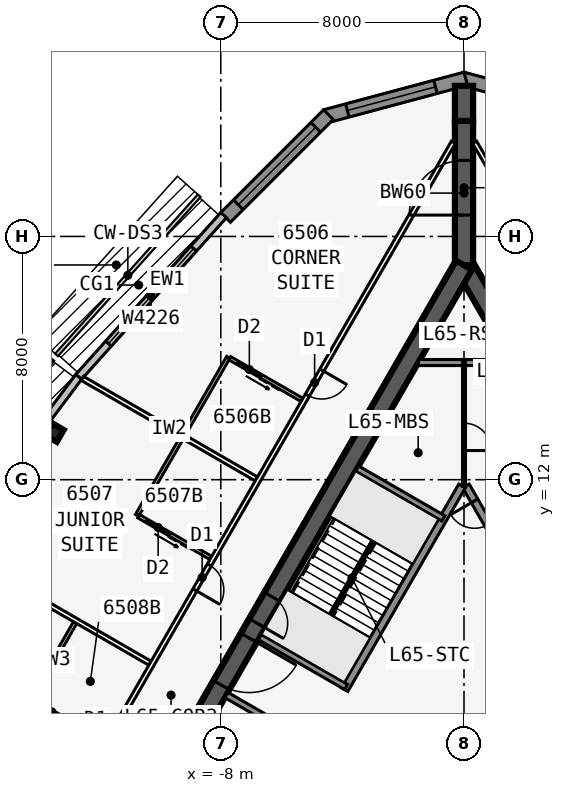
"""IFC4 building model, lengths in metres.
Left out: names, types, materials, properties, quantities, classifications, styles, units other than length and angle.
Written with IfcOpenShell. Run it as: python <this file> out.ifc"""

import sys

from ifc_helpers import new_model, si_unit, direction, frame, frame_2d, origin, origin_2d, place, context, subcontext, project, spatial, polyline, rectangle, i_section, outline, extrude, element, fill, save


model = new_model("IFC4")
c1 = context("Model", 3, precision=1e-05, world=origin(), true_north=direction((0.0, 1.0)))
c2 = subcontext(c1, "Body", "Model", "MODEL_VIEW")
j1 = project(units=[si_unit("LENGTHUNIT", "METRE"), si_unit("PLANEANGLEUNIT", "RADIAN")], contexts=[c1])
p1 = place(None, origin())
s1 = spatial("IfcSite", under=j1, at=p1, CompositionType="ELEMENT")
p2 = place(p1, origin())
s2 = spatial("IfcBuilding", under=s1, at=p2, CompositionType="ELEMENT")
p3 = place(p2, frame((0.0, 0.0, 246.5)))
s3 = spatial("IfcBuildingStorey", under=s2, at=p3, CompositionType="ELEMENT", Elevation=246.5)
p4 = place(p3, frame((16.5, -9.526, 0.0), z_axis=(0.0, 0.0, 1.0), x_axis=(-0.499999749417, 0.866025548458, 0.0)))
e1 = element("IfcWall", 1, at=p4, inside=s3, PredefinedType="SHEAR", context=c2, shape_type="SweptSolid", body=[
    extrude(rectangle(XDim=33.0, YDim=0.6, at=frame_2d((16.5, 0.0))), origin(), (0.0, 0.0, 1.0), 3.6),
])
p5 = place(p4, frame((14.15, 0.0, 0.0)))
e2 = element("IfcOpeningElement", 2, at=p5, cuts=e1, PredefinedType="OPENING", context=c2, shape_type="SweptSolid", body=[
    extrude(rectangle(XDim=1.8, YDim=2.13, at=frame_2d((0.9, 1.065))), frame((0.0, 0.31, 0.0), z_axis=(0.0, -1.0, 0.0), x_axis=(1.0, 0.0, 0.0)), (0.0, 0.0, 1.0), 0.62),
])
p6 = place(p4, frame((12.6, 0.0, 0.0)))
e3 = element("IfcOpeningElement", 3, at=p6, cuts=e1, PredefinedType="OPENING", context=c2, shape_type="SweptSolid", body=[
    extrude(rectangle(XDim=1.0, YDim=2.13, at=frame_2d((0.5, 1.065))), frame((0.0, 0.31, 0.0), z_axis=(0.0, -1.0, 0.0), x_axis=(1.0, 0.0, 0.0)), (0.0, 0.0, 1.0), 0.62),
])
p7 = place(p3, frame((5.379, 2.586, 0.0), z_axis=(0.0, 0.0, 1.0), x_axis=(-0.500001375892, 0.866024609411, 0.0)))
e4 = element("IfcWall", 4, at=p7, inside=s3, PredefinedType="SOLIDWALL", context=c2, shape_type="SweptSolid", body=[
    extrude(rectangle(XDim=10.633, YDim=0.25, at=frame_2d((5.316, 0.0))), origin(), (0.0, 0.0, 1.0), 3.435),
])
p8 = place(p7, frame((9.164, 0.0, 0.0)))
e5 = element("IfcOpeningElement", 5, at=p8, cuts=e4, PredefinedType="OPENING", context=c2, shape_type="SweptSolid", body=[
    extrude(rectangle(XDim=0.9, YDim=2.13, at=frame_2d((0.45, 1.065))), frame((0.0, 0.135, 0.0), z_axis=(0.0, -1.0, 0.0), x_axis=(1.0, 0.0, 0.0)), (0.0, 0.0, 1.0), 0.27),
])
p9 = place(p7, frame((1.0, 0.0, 0.0)))
e6 = element("IfcOpeningElement", 6, at=p9, cuts=e4, PredefinedType="OPENING", context=c2, shape_type="SweptSolid", body=[
    extrude(rectangle(XDim=1.1, YDim=2.13, at=frame_2d((0.55, 1.065))), frame((0.0, 0.135, 0.0), z_axis=(0.0, -1.0, 0.0), x_axis=(1.0, 0.0, 0.0)), (0.0, 0.0, 1.0), 0.27),
])
p10 = place(p7, frame((3.9, 0.0, 0.0)))
e7 = element("IfcOpeningElement", 7, at=p10, cuts=e4, PredefinedType="OPENING", context=c2, shape_type="SweptSolid", body=[
    extrude(rectangle(XDim=1.1, YDim=2.13, at=frame_2d((0.55, 1.065))), frame((0.0, 0.135, 0.0), z_axis=(0.0, -1.0, 0.0), x_axis=(1.0, 0.0, 0.0)), (0.0, 0.0, 1.0), 0.27),
])
p11 = place(p7, frame((6.8, 0.0, 0.0)))
e8 = element("IfcOpeningElement", 8, at=p11, cuts=e4, PredefinedType="OPENING", context=c2, shape_type="SweptSolid", body=[
    extrude(rectangle(XDim=1.1, YDim=2.13, at=frame_2d((0.55, 1.065))), frame((0.0, 0.135, 0.0), z_axis=(0.0, -1.0, 0.0), x_axis=(1.0, 0.0, 0.0)), (0.0, 0.0, 1.0), 0.27),
])
p12 = place(p3, frame((0.0, 19.052, 0.0), z_axis=(0.0, 0.0, 1.0), x_axis=(-0.499999749417, -0.866025548458, 0.0)))
e9 = element("IfcWall", 9, at=p12, inside=s3, PredefinedType="SHEAR", context=c2, shape_type="SweptSolid", body=[
    extrude(rectangle(XDim=33.0, YDim=0.6, at=frame_2d((16.5, 0.0))), origin(), (0.0, 0.0, 1.0), 3.6),
])
p13 = place(p12, frame((14.15, 0.0, 0.0)))
e10 = element("IfcOpeningElement", 10, at=p13, cuts=e9, PredefinedType="OPENING", context=c2, shape_type="SweptSolid", body=[
    extrude(rectangle(XDim=1.8, YDim=2.13, at=frame_2d((0.9, 1.065))), frame((0.0, 0.31, 0.0), z_axis=(0.0, -1.0, 0.0), x_axis=(1.0, 0.0, 0.0)), (0.0, 0.0, 1.0), 0.62),
])
p14 = place(p12, frame((12.6, 0.0, 0.0)))
e11 = element("IfcOpeningElement", 11, at=p14, cuts=e9, PredefinedType="OPENING", context=c2, shape_type="SweptSolid", body=[
    extrude(rectangle(XDim=1.0, YDim=2.13, at=frame_2d((0.5, 1.065))), frame((0.0, 0.31, 0.0), z_axis=(0.0, -1.0, 0.0), x_axis=(1.0, 0.0, 0.0)), (0.0, 0.0, 1.0), 0.62),
])
p15 = place(p3, frame((-0.062, 11.794, 0.0), z_axis=(0.0, 0.0, 1.0), x_axis=(-0.500006680225, -0.86602154692, 0.0)))
e12 = element("IfcWall", 12, at=p15, inside=s3, PredefinedType="SOLIDWALL", context=c2, shape_type="SweptSolid", body=[
    extrude(rectangle(XDim=7.733, YDim=0.25, at=frame_2d((3.866, 0.0))), origin(), (0.0, 0.0, 1.0), 3.435),
])
for number, where, z_axis, x_axis in (
    (13, (-0.679, 10.727, 0.0), (0.0, 0.0, 1.0), (-0.866, 0.5, 0.0)),
    (14, (-3.879, 5.184, 0.0), (0.0, 0.0, 1.0), (-0.866, 0.5, 0.0)),
    (15, (-4.979, 3.279, 0.0), (0.0, 0.0, 1.0), (-0.866, 0.5, 0.0)),
):
    element("IfcWall", number, at=place(p3, frame(where, z_axis=z_axis, x_axis=x_axis)), inside=s3, PredefinedType="SOLIDWALL", context=c2, shape_type="SweptSolid", body=[
        extrude(rectangle(XDim=3.275, YDim=0.2, at=frame_2d((1.637, 0.0))), origin(), (0.0, 0.0, 1.0), 3.435),
    ])
p16 = place(p3, frame((0.0, 19.052, 0.0), z_axis=(0.0, 0.0, 1.0), x_axis=(0.0, 1.0, 0.0)))
e16 = element("IfcWall", 16, at=p16, inside=s3, PredefinedType="SHEAR", context=c2, shape_type="SweptSolid", body=[
    extrude(rectangle(XDim=4.746, YDim=0.6, at=frame_2d((2.373, 0.0))), origin(), (0.0, 0.0, 1.0), 3.6),
])
p17 = place(p16, frame((1.65, 0.0, 0.0)))
e17 = element("IfcOpeningElement", 17, at=p17, cuts=e16, PredefinedType="OPENING", context=c2, shape_type="SweptSolid", body=[
    extrude(rectangle(XDim=1.8, YDim=2.13, at=frame_2d((0.9, 1.065))), frame((0.0, 0.31, 0.0), z_axis=(0.0, -1.0, 0.0), x_axis=(1.0, 0.0, 0.0)), (0.0, 0.0, 1.0), 0.62),
])
p18 = place(p3, frame((0.0, 23.799, 0.0), z_axis=(0.0, 0.0, 1.0), x_axis=(0.0, 1.0, 0.0)))
e18 = element("IfcWall", 18, at=p18, inside=s3, PredefinedType="SHEAR", context=c2, shape_type="SweptSolid", body=[
    extrude(rectangle(XDim=1.155, YDim=0.6, at=frame_2d((0.577, 0.0))), origin(), (0.0, 0.0, 1.0), 3.6),
])
p19 = place(p3, frame((-13.461, 13.545, 0.0), z_axis=(0.0, 0.0, 1.0), x_axis=(-0.866025403784, 0.5, 0.0)))
e19 = element("IfcColumn", 19, at=p19, inside=s3, PredefinedType="COLUMN", context=c2, shape_type="SweptSolid", body=[
    extrude(i_section(OverallWidth=0.419, OverallDepth=0.455, WebThickness=0.042, FlangeThickness=0.068, at=origin_2d()), origin(), (0.0, 0.0, 1.0), 3.6),
])
p20 = place(p3, frame((4.561, 23.948, 0.0), z_axis=(0.0, 0.0, 1.0), x_axis=(-0.965926628191, 0.258816052347, 0.0)))
e20 = element("IfcWall", 20, at=p20, inside=s3, PredefinedType="SOLIDWALL", context=c2, shape_type="SweptSolid", body=[
    extrude(outline(polyline([(4.781, 0.225), (4.722, 0.225), (4.375, 0.132), (4.351, 0.225), (0.0, 0.225), (0.0, -0.225), (4.781, -0.225), (4.781, 0.225)])), origin(), (0.0, 0.0, 1.0), 3.435),
])
p21 = place(p20, frame((0.75, 0.0, 0.45)))
e21 = element("IfcOpeningElement", 21, at=p21, cuts=e20, PredefinedType="OPENING", context=c2, shape_type="SweptSolid", body=[
    extrude(rectangle(XDim=3.0, YDim=2.6, at=frame_2d((1.5, 1.3))), frame((0.0, 0.235, 0.0), z_axis=(0.0, -1.0, 0.0), x_axis=(1.0, 0.0, 0.0)), (0.0, 0.0, 1.0), 0.47),
])
p22 = place(p3, frame((0.058, 25.186, 0.0), z_axis=(0.0, 0.0, 1.0), x_axis=(-0.965926628191, -0.258816052347, 0.0)))
e22 = element("IfcWall", 22, at=p22, inside=s3, PredefinedType="SOLIDWALL", context=c2, shape_type="SweptSolid", body=[
    extrude(outline(polyline([(4.781, 0.225), (0.431, 0.225), (0.406, 0.132), (0.059, 0.225), (0.0, 0.225), (0.0, -0.225), (4.781, -0.225), (4.781, 0.225)])), origin(), (0.0, 0.0, 1.0), 3.435),
])
p23 = place(p22, frame((1.031, 0.0, 0.45)))
e23 = element("IfcOpeningElement", 23, at=p23, cuts=e22, PredefinedType="OPENING", context=c2, shape_type="SweptSolid", body=[
    extrude(rectangle(XDim=3.0, YDim=2.6, at=frame_2d((1.5, 1.3))), frame((0.0, 0.235, 0.0), z_axis=(0.0, -1.0, 0.0), x_axis=(1.0, 0.0, 0.0)), (0.0, 0.0, 1.0), 0.47),
])
p24 = place(p3, frame((-4.46, 24.007, 0.0), z_axis=(0.0, 0.0, 1.0), x_axis=(-0.707106781187, -0.707106781187, 0.0)))
e24 = element("IfcWall", 24, at=p24, inside=s3, PredefinedType="SOLIDWALL", context=c2, shape_type="SweptSolid", body=[
    extrude(rectangle(XDim=4.781, YDim=0.45, at=frame_2d((2.391, 0.0))), origin(), (0.0, 0.0, 1.0), 3.435),
])
p25 = place(p24, frame((0.591, 0.0, 0.45)))
e25 = element("IfcOpeningElement", 25, at=p25, cuts=e24, PredefinedType="OPENING", context=c2, shape_type="SweptSolid", body=[
    extrude(rectangle(XDim=3.6, YDim=2.6, at=frame_2d((1.8, 1.3))), frame((0.0, 0.235, 0.0), z_axis=(0.0, -1.0, 0.0), x_axis=(1.0, 0.0, 0.0)), (0.0, 0.0, 1.0), 0.47),
])
p26 = place(p3, frame((-7.907, 20.701, 0.0), z_axis=(0.0, 0.0, 1.0), x_axis=(-0.667303550892, -0.744785855778, 0.0)))
e26 = element("IfcWall", 26, at=p26, inside=s3, PredefinedType="STANDARD", context=c2, shape_type="SweptSolid", body=[
    extrude(rectangle(XDim=7.153, YDim=0.25, at=frame_2d((3.576, 0.0))), origin(), (0.0, 0.0, 1.0), 3.435),
])
p27 = place(p26, frame((1.476, 0.0, 0.45)))
e27 = element("IfcOpeningElement", 27, at=p27, cuts=e26, PredefinedType="OPENING", context=c2, shape_type="SweptSolid", body=[
    extrude(rectangle(XDim=4.2, YDim=2.6, at=frame_2d((2.1, 1.3))), frame((0.0, 0.135, 0.0), z_axis=(0.0, -1.0, 0.0), x_axis=(1.0, 0.0, 0.0)), (0.0, 0.0, 1.0), 0.27),
])
p28 = place(p3, frame((-12.673, 15.382, 0.0), z_axis=(0.0, 0.0, 1.0), x_axis=(-0.599650843534, -0.800261748335, 0.0)))
e28 = element("IfcWall", 28, at=p28, inside=s3, PredefinedType="STANDARD", context=c2, shape_type="SweptSolid", body=[
    extrude(rectangle(XDim=2.014, YDim=0.25, at=frame_2d((1.007, 0.0))), origin(), (0.0, 0.0, 1.0), 3.435),
])
p29 = place(p3, frame((6.763, 11.988, 0.0), z_axis=(0.0, 0.0, 1.0), x_axis=(-0.499993758181, 0.86602900747, 0.0)))
e29 = element("IfcWall", 29, at=p29, inside=s3, PredefinedType="PARTITIONING", context=c2, shape_type="SweptSolid", body=[
    extrude(rectangle(XDim=12.827, YDim=0.15, at=frame_2d((6.414, 0.0))), origin(), (0.0, 0.0, 1.0), 3.435),
])
p30 = place(p29, frame((3.225, 0.0, 0.0)))
e30 = element("IfcOpeningElement", 30, at=p30, cuts=e29, PredefinedType="OPENING", context=c2, shape_type="SweptSolid", body=[
    extrude(rectangle(XDim=0.95, YDim=2.13, at=frame_2d((0.475, 1.065))), frame((0.0, 0.085, 0.0), z_axis=(0.0, -1.0, 0.0), x_axis=(1.0, 0.0, 0.0)), (0.0, 0.0, 1.0), 0.17),
])
p31 = place(p3, frame((-0.35, 23.096, 0.0), z_axis=(0.0, 0.0, 1.0), x_axis=(-0.499998875317, -0.866026053119, 0.0)))
e31 = element("IfcWall", 31, at=p31, inside=s3, PredefinedType="PARTITIONING", context=c2, shape_type="SweptSolid", body=[
    extrude(rectangle(XDim=39.654, YDim=0.15, at=frame_2d((19.827, 0.0))), origin(), (0.0, 0.0, 1.0), 3.435),
])
p32 = place(p31, frame((8.652, 0.0, 0.0)))
e32 = element("IfcOpeningElement", 32, at=p32, cuts=e31, PredefinedType="OPENING", context=c2, shape_type="SweptSolid", body=[
    extrude(rectangle(XDim=0.95, YDim=2.13, at=frame_2d((0.475, 1.065))), frame((0.0, 0.085, 0.0), z_axis=(0.0, -1.0, 0.0), x_axis=(1.0, 0.0, 0.0)), (0.0, 0.0, 1.0), 0.17),
])
p33 = place(p31, frame((16.052, 0.0, 0.0)))
e33 = element("IfcOpeningElement", 33, at=p33, cuts=e31, PredefinedType="OPENING", context=c2, shape_type="SweptSolid", body=[
    extrude(rectangle(XDim=0.95, YDim=2.13, at=frame_2d((0.475, 1.065))), frame((0.0, 0.085, 0.0), z_axis=(0.0, -1.0, 0.0), x_axis=(1.0, 0.0, 0.0)), (0.0, 0.0, 1.0), 0.17),
])
p34 = place(p31, frame((23.052, 0.0, 0.0)))
e34 = element("IfcOpeningElement", 34, at=p34, cuts=e31, PredefinedType="OPENING", context=c2, shape_type="SweptSolid", body=[
    extrude(rectangle(XDim=0.95, YDim=2.13, at=frame_2d((0.475, 1.065))), frame((0.0, 0.085, 0.0), z_axis=(0.0, -1.0, 0.0), x_axis=(1.0, 0.0, 0.0)), (0.0, 0.0, 1.0), 0.17),
])
p35 = place(p31, frame((30.052, 0.0, 0.0)))
e35 = element("IfcOpeningElement", 35, at=p35, cuts=e31, PredefinedType="OPENING", context=c2, shape_type="SweptSolid", body=[
    extrude(rectangle(XDim=0.95, YDim=2.13, at=frame_2d((0.475, 1.065))), frame((0.0, 0.085, 0.0), z_axis=(0.0, -1.0, 0.0), x_axis=(1.0, 0.0, 0.0)), (0.0, 0.0, 1.0), 0.17),
])
p36 = place(p3, frame((-6.829, 12.025, 0.0), z_axis=(0.0, 0.0, 1.0), x_axis=(-0.866029323189, 0.499993211332, 0.0)))
e36 = element("IfcWall", 36, at=p36, inside=s3, PredefinedType="PARTITIONING", context=c2, shape_type="SweptSolid", body=[
    extrude(rectangle(XDim=6.608, YDim=0.15, at=frame_2d((3.304, 0.0))), origin(), (0.0, 0.0, 1.0), 2.678),
])
p37 = place(p3, frame((-10.329, 5.963, 0.0), z_axis=(0.0, 0.0, 1.0), x_axis=(-0.866011785882, 0.500023586156, 0.0)))
e37 = element("IfcWall", 37, at=p37, inside=s3, PredefinedType="PARTITIONING", context=c2, shape_type="SweptSolid", body=[
    extrude(rectangle(XDim=6.854, YDim=0.15, at=frame_2d((3.427, 0.0))), origin(), (0.0, 0.0, 1.0), 2.678),
])
p38 = place(p3, frame((-7.753, 16.023, 0.0), z_axis=(0.0, 0.0, 1.0), x_axis=(-0.499990139034, -0.866031096941, 0.0)))
e38 = element("IfcWall", 38, at=p38, inside=s3, PredefinedType="PLUMBINGWALL", context=c2, shape_type="SweptSolid", body=[
    extrude(rectangle(XDim=3.0, YDim=0.12, at=frame_2d((1.5, 0.0))), origin(), (0.0, 0.0, 1.0), 3.435),
])
p39 = place(p3, frame((-5.329, 14.623, 0.0), z_axis=(0.0, 0.0, 1.0), x_axis=(-0.865997131366, 0.500048966069, 0.0)))
e39 = element("IfcWall", 39, at=p39, inside=s3, PredefinedType="PLUMBINGWALL", context=c2, shape_type="SweptSolid", body=[
    extrude(rectangle(XDim=2.74, YDim=0.12, at=frame_2d((1.37, 0.0))), origin(), (0.0, 0.0, 1.0), 3.435),
])
p40 = place(p39, frame((1.55, 0.0, 0.0)))
e40 = element("IfcOpeningElement", 40, at=p40, cuts=e39, PredefinedType="OPENING", context=c2, shape_type="SweptSolid", body=[
    extrude(rectangle(XDim=0.9, YDim=2.13, at=frame_2d((0.45, 1.065))), frame((0.0, 0.07, 0.0), z_axis=(0.0, -1.0, 0.0), x_axis=(1.0, 0.0, 0.0)), (0.0, 0.0, 1.0), 0.14),
])
p41 = place(p3, frame((-9.253, 13.425, 0.0), z_axis=(0.0, 0.0, 1.0), x_axis=(-0.499990139034, -0.866031096941, 0.0)))
e41 = element("IfcWall", 41, at=p41, inside=s3, PredefinedType="PLUMBINGWALL", context=c2, shape_type="SweptSolid", body=[
    extrude(rectangle(XDim=3.0, YDim=0.12, at=frame_2d((1.5, 0.0))), origin(), (0.0, 0.0, 1.0), 3.435),
])
p42 = place(p3, frame((-8.329, 9.427, 0.0), z_axis=(0.0, 0.0, 1.0), x_axis=(-0.866035715982, 0.499982138324, 0.0)))
e42 = element("IfcWall", 42, at=p42, inside=s3, PredefinedType="PLUMBINGWALL", context=c2, shape_type="SweptSolid", body=[
    extrude(rectangle(XDim=2.74, YDim=0.12, at=frame_2d((1.37, 0.0))), origin(), (0.0, 0.0, 1.0), 3.435),
])
p43 = place(p42, frame((1.55, 0.0, 0.0)))
e43 = element("IfcOpeningElement", 43, at=p43, cuts=e42, PredefinedType="OPENING", context=c2, shape_type="SweptSolid", body=[
    extrude(rectangle(XDim=0.9, YDim=2.13, at=frame_2d((0.45, 1.065))), frame((0.0, 0.07, 0.0), z_axis=(0.0, -1.0, 0.0), x_axis=(1.0, 0.0, 0.0)), (0.0, 0.0, 1.0), 0.14),
])
p44 = place(p3, frame((-12.753, 7.363, 0.0), z_axis=(0.0, 0.0, 1.0), x_axis=(-0.50002537861, -0.866010750942, 0.0)))
e44 = element("IfcWall", 44, at=p44, inside=s3, PredefinedType="PLUMBINGWALL", context=c2, shape_type="SweptSolid", body=[
    extrude(rectangle(XDim=3.0, YDim=0.12, at=frame_2d((1.5, 0.0))), origin(), (0.0, 0.0, 1.0), 3.435),
])
p45 = place(p3, frame((-11.829, 3.365, 0.0), z_axis=(0.0, 0.0, 1.0), x_axis=(-0.865997131366, 0.500048966069, 0.0)))
e45 = element("IfcWall", 45, at=p45, inside=s3, PredefinedType="PLUMBINGWALL", context=c2, shape_type="SweptSolid", body=[
    extrude(rectangle(XDim=2.74, YDim=0.12, at=frame_2d((1.37, 0.0))), origin(), (0.0, 0.0, 1.0), 3.435),
])
p46 = place(p45, frame((1.55, 0.0, 0.0)))
e46 = element("IfcOpeningElement", 46, at=p46, cuts=e45, PredefinedType="OPENING", context=c2, shape_type="SweptSolid", body=[
    extrude(rectangle(XDim=0.9, YDim=2.13, at=frame_2d((0.45, 1.065))), frame((0.0, 0.07, 0.0), z_axis=(0.0, -1.0, 0.0), x_axis=(1.0, 0.0, 0.0)), (0.0, 0.0, 1.0), 0.14),
])
p47 = place(p3, frame((-1.501, 15.853, 0.0), z_axis=(0.0, 0.0, 1.0), x_axis=(1.0, 0.0, 0.0)))
e47 = element("IfcWall", 47, at=p47, inside=s3, PredefinedType="SOLIDWALL", context=c2, shape_type="SweptSolid", body=[
    extrude(rectangle(XDim=3.002, YDim=0.2, at=frame_2d((1.501, 0.0))), origin(), (0.0, 0.0, 1.0), 3.435),
])
p48 = place(p3, frame((0.0, 15.853, 0.0), z_axis=(0.0, 0.0, 1.0), x_axis=(0.0, -1.0, 0.0)))
e48 = element("IfcWall", 48, at=p48, inside=s3, PredefinedType="PARTITIONING", context=c2, shape_type="SweptSolid", body=[
    extrude(rectangle(XDim=4.075, YDim=0.1, at=frame_2d((2.038, 0.0))), origin(), (0.0, 0.0, 1.0), 3.435),
])
p49 = place(p48, frame((1.995, 0.0, 0.0)))
e49 = element("IfcOpeningElement", 49, at=p49, cuts=e48, PredefinedType="OPENING", context=c2, shape_type="SweptSolid", body=[
    extrude(rectangle(XDim=0.9, YDim=2.13, at=frame_2d((0.45, 1.065))), frame((0.0, 0.06, 0.0), z_axis=(0.0, -1.0, 0.0), x_axis=(1.0, 0.0, 0.0)), (0.0, 0.0, 1.0), 0.12),
])
p50 = place(p3, frame((-2.988, 9.978, 0.0), z_axis=(0.0, 0.0, 1.0), x_axis=(-0.499992232847, -0.866029888106, 0.0)))
e50 = element("IfcWall", 50, at=p50, inside=s3, PredefinedType="SOLIDWALL", context=c2, shape_type="SweptSolid", body=[
    extrude(rectangle(XDim=2.794, YDim=0.1, at=frame_2d((1.397, 0.0))), origin(), (0.0, 0.0, 1.0), 3.6),
])
p51 = place(p23, origin())
e51 = element("IfcWindow", 51, at=p51, inside=s3, PartitioningType="SINGLE_PANEL", PredefinedType="WINDOW", context=c2, shape_type="SweptSolid", body=[
    extrude(rectangle(XDim=3.0, YDim=2.6, at=frame_2d((1.5, 1.3))), frame((0.0, 0.03, 0.0), z_axis=(0.0, -1.0, 0.0), x_axis=(1.0, 0.0, 0.0)), (0.0, 0.0, 1.0), 0.06),
])
fill(e23, e51)
p52 = place(p25, origin())
e52 = element("IfcWindow", 52, at=p52, inside=s3, PartitioningType="SINGLE_PANEL", PredefinedType="WINDOW", context=c2, shape_type="SweptSolid", body=[
    extrude(rectangle(XDim=3.6, YDim=2.6, at=frame_2d((1.8, 1.3))), frame((0.0, 0.03, 0.0), z_axis=(0.0, -1.0, 0.0), x_axis=(1.0, 0.0, 0.0)), (0.0, 0.0, 1.0), 0.06),
])
fill(e25, e52)
p53 = place(p27, origin())
e53 = element("IfcWindow", 53, at=p53, inside=s3, PartitioningType="SINGLE_PANEL", PredefinedType="WINDOW", context=c2, shape_type="SweptSolid", body=[
    extrude(rectangle(XDim=4.2, YDim=2.6, at=frame_2d((2.1, 1.3))), frame((0.0, 0.03, 0.0), z_axis=(0.0, -1.0, 0.0), x_axis=(1.0, 0.0, 0.0)), (0.0, 0.0, 1.0), 0.06),
])
fill(e27, e53)
p54 = place(p40, origin())
e54 = element("IfcDoor", 54, at=p54, inside=s3, OperationType="SLIDING_TO_LEFT", PredefinedType="DOOR", context=c2, shape_type="SweptSolid", body=[
    extrude(rectangle(XDim=0.9, YDim=2.13, at=frame_2d((0.45, 1.065))), frame((0.0, 0.025, 0.0), z_axis=(0.0, -1.0, 0.0), x_axis=(1.0, 0.0, 0.0)), (0.0, 0.0, 1.0), 0.05),
])
fill(e40, e54)
p55 = place(p32, origin())
e55 = element("IfcDoor", 55, at=p55, inside=s3, OperationType="SINGLE_SWING_LEFT", PredefinedType="DOOR", context=c2, shape_type="SweptSolid", body=[
    extrude(rectangle(XDim=0.95, YDim=2.13, at=frame_2d((0.475, 1.065))), frame((0.0, 0.025, 0.0), z_axis=(0.0, -1.0, 0.0), x_axis=(1.0, 0.0, 0.0)), (0.0, 0.0, 1.0), 0.05),
])
fill(e32, e55)
p56 = place(p43, origin())
e56 = element("IfcDoor", 56, at=p56, inside=s3, OperationType="SLIDING_TO_LEFT", PredefinedType="DOOR", context=c2, shape_type="SweptSolid", body=[
    extrude(rectangle(XDim=0.9, YDim=2.13, at=frame_2d((0.45, 1.065))), frame((0.0, 0.025, 0.0), z_axis=(0.0, -1.0, 0.0), x_axis=(1.0, 0.0, 0.0)), (0.0, 0.0, 1.0), 0.05),
])
fill(e43, e56)
p57 = place(p33, origin())
e57 = element("IfcDoor", 57, at=p57, inside=s3, OperationType="SINGLE_SWING_RIGHT", PredefinedType="DOOR", context=c2, shape_type="SweptSolid", body=[
    extrude(rectangle(XDim=0.95, YDim=2.13, at=frame_2d((0.475, 1.065))), frame((0.0, 0.025, 0.0), z_axis=(0.0, -1.0, 0.0), x_axis=(1.0, 0.0, 0.0)), (0.0, 0.0, 1.0), 0.05),
])
fill(e33, e57)
p58 = place(p46, origin())
e58 = element("IfcDoor", 58, at=p58, inside=s3, OperationType="SLIDING_TO_LEFT", PredefinedType="DOOR", context=c2, shape_type="SweptSolid", body=[
    extrude(rectangle(XDim=0.9, YDim=2.13, at=frame_2d((0.45, 1.065))), frame((0.0, 0.025, 0.0), z_axis=(0.0, -1.0, 0.0), x_axis=(1.0, 0.0, 0.0)), (0.0, 0.0, 1.0), 0.05),
])
fill(e46, e58)
p59 = place(p13, origin())
e59 = element("IfcDoor", 59, at=p59, inside=s3, OperationType="DOUBLE_DOOR_SINGLE_SWING", PredefinedType="DOOR", context=c2, shape_type="SweptSolid", body=[
    extrude(rectangle(XDim=1.8, YDim=2.13, at=frame_2d((0.9, 1.065))), frame((0.0, 0.025, 0.0), z_axis=(0.0, -1.0, 0.0), x_axis=(1.0, 0.0, 0.0)), (0.0, 0.0, 1.0), 0.05),
])
fill(e10, e59)
p60 = place(p14, origin())
e60 = element("IfcDoor", 60, at=p60, inside=s3, OperationType="SINGLE_SWING_RIGHT", PredefinedType="DOOR", context=c2, shape_type="SweptSolid", body=[
    extrude(rectangle(XDim=1.0, YDim=2.13, at=frame_2d((0.5, 1.065))), frame((0.0, 0.025, 0.0), z_axis=(0.0, -1.0, 0.0), x_axis=(1.0, 0.0, 0.0)), (0.0, 0.0, 1.0), 0.05),
])
fill(e11, e60)
p61 = place(p17, origin())
e61 = element("IfcDoor", 61, at=p61, inside=s3, OperationType="DOUBLE_DOOR_DOUBLE_SWING", PredefinedType="DOOR", context=c2, shape_type="SweptSolid", body=[
    extrude(rectangle(XDim=1.8, YDim=2.13, at=frame_2d((0.9, 1.065))), frame((0.0, 0.025, 0.0), z_axis=(0.0, -1.0, 0.0), x_axis=(1.0, 0.0, 0.0)), (0.0, 0.0, 1.0), 0.05),
])
fill(e17, e61)
p62 = place(p8, origin())
e62 = element("IfcDoor", 62, at=p62, inside=s3, OperationType="SINGLE_SWING_RIGHT", PredefinedType="DOOR", context=c2, shape_type="SweptSolid", body=[
    extrude(rectangle(XDim=0.9, YDim=2.13, at=frame_2d((0.45, 1.065))), frame((0.0, 0.025, 0.0), z_axis=(0.0, -1.0, 0.0), x_axis=(1.0, 0.0, 0.0)), (0.0, 0.0, 1.0), 0.05),
])
fill(e5, e62)
p63 = place(p49, origin())
e63 = element("IfcDoor", 63, at=p63, inside=s3, OperationType="SINGLE_SWING_RIGHT", PredefinedType="DOOR", context=c2, shape_type="SweptSolid", body=[
    extrude(rectangle(XDim=0.9, YDim=2.13, at=frame_2d((0.45, 1.065))), frame((0.0, 0.025, 0.0), z_axis=(0.0, -1.0, 0.0), x_axis=(1.0, 0.0, 0.0)), (0.0, 0.0, 1.0), 0.05),
])
fill(e49, e63)
save(model, sys.argv[1])
